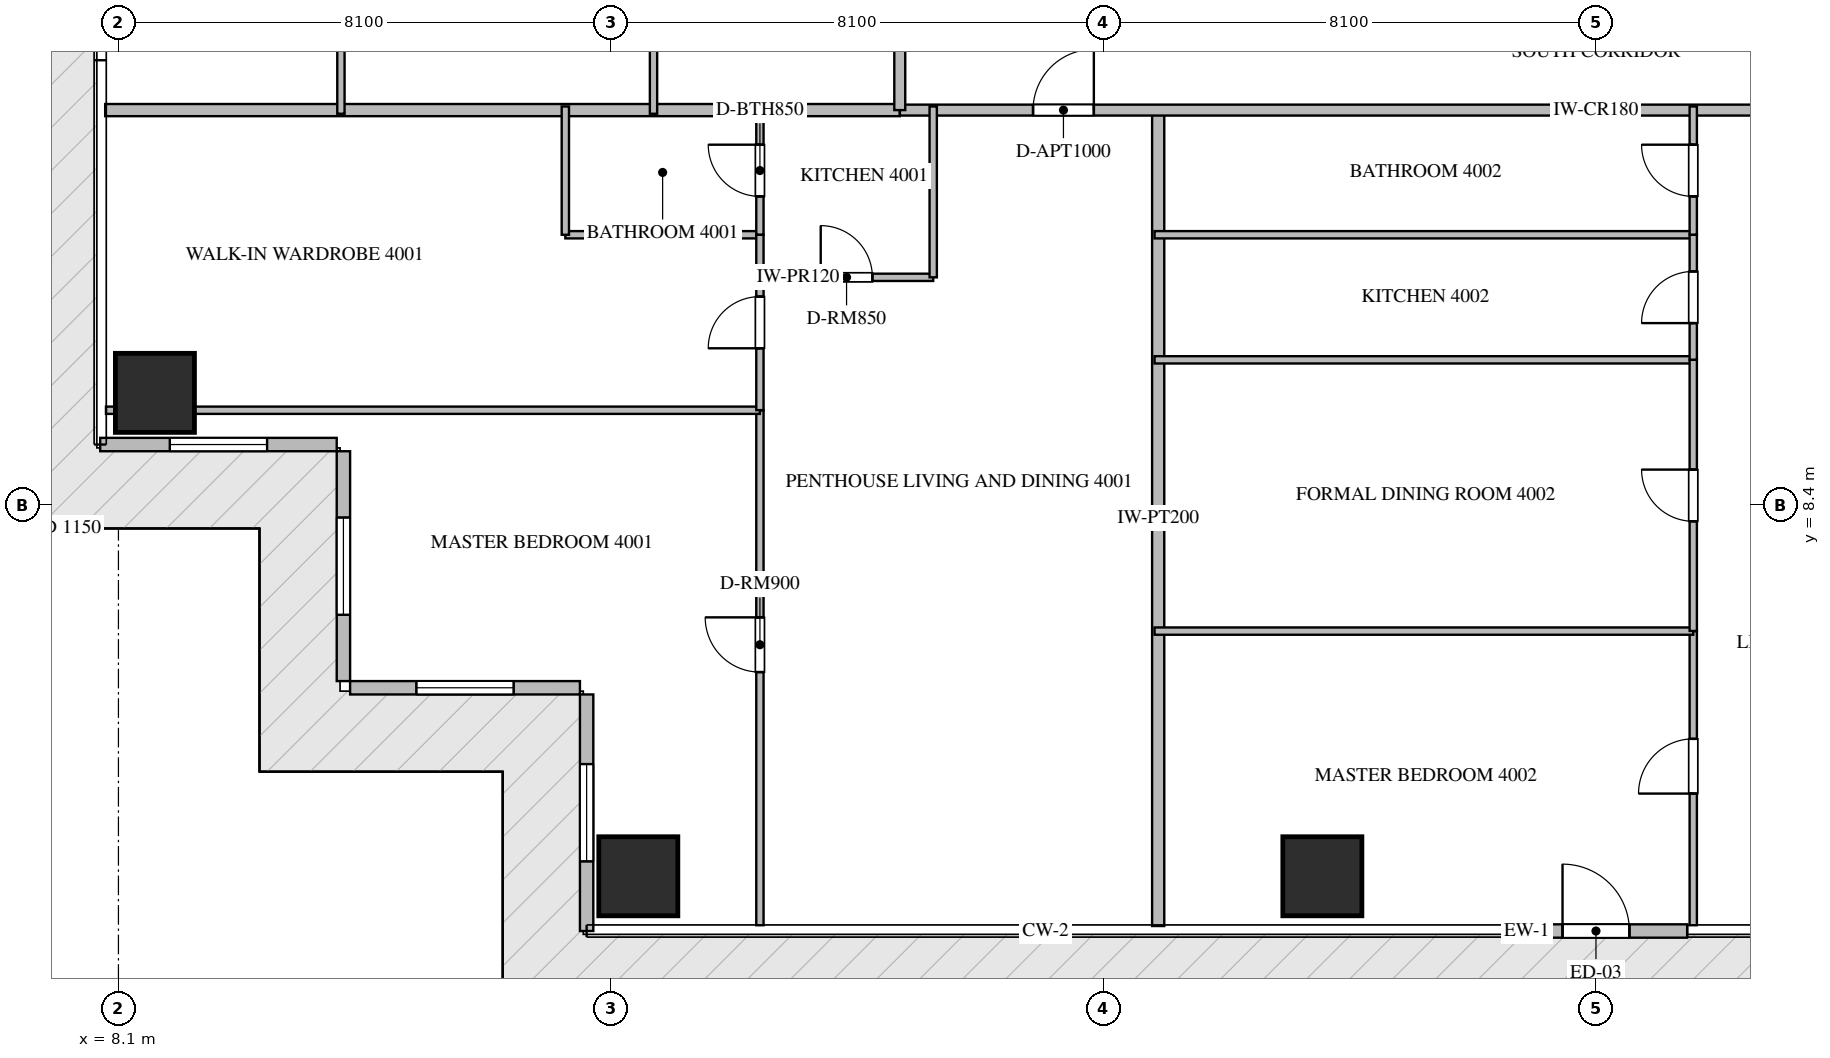
"""IFC4 building model, lengths in metres.
Left out: names, types, materials, properties, quantities, classifications, styles, units other than length and angle.
Written with IfcOpenShell. Run it as: python <this file> out.ifc"""

import sys

from ifc_helpers import new_model, si_unit, direction, frame, frame_2d, origin, origin_2d, place, context, subcontext, project, spatial, rectangle, extrude, source, transform, mapped, element, fill, save


model = new_model("IFC4")
c1 = context("Model", 3, precision=1e-05, world=origin(), true_north=direction((0.0, 1.0)))
c2 = subcontext(c1, "Body", "Model", "MODEL_VIEW")
j1 = project(units=[si_unit("LENGTHUNIT", "METRE"), si_unit("PLANEANGLEUNIT", "RADIAN")], contexts=[c1])
p1 = place(None, origin())
s1 = spatial("IfcSite", under=j1, at=p1, CompositionType="ELEMENT")
p2 = place(p1, origin())
s2 = spatial("IfcBuilding", under=s1, at=p2, CompositionType="ELEMENT")
p3 = place(p2, frame((0.0, 0.0, 161.4)))
s3 = spatial("IfcBuildingStorey", under=s2, at=p3, CompositionType="ELEMENT", Elevation=161.4)
m1 = source(origin(), c2, "Body", "SweptSolid", [
    extrude(rectangle(XDim=1.3, YDim=1.3, at=origin_2d()), origin(), (0.0, 0.0, 1.0), 3.75),
])
for number, where, z_axis, x_axis in (
    (1, (16.65, 2.3, -0.26), (0.0, 0.0, 1.0), (1.0, 0.0, 0.0)),
    (2, (27.9, 2.3, -0.26), (0.0, 0.0, 1.0), (1.0, 0.0, 0.0)),
    (3, (8.7, 10.25, -0.26), (0.0, 0.0, 1.0), (1.0, 0.0, 0.0)),
):
    element("IfcColumn", number, at=place(p3, frame(where, z_axis=z_axis, x_axis=x_axis)), inside=s3, PredefinedType="COLUMN", context=c2, shape_type="MappedRepresentation", body=[
        mapped(m1, transform((0.0, 0.0, 0.0), scale=1.0)),
    ])
p4 = place(p3, frame((30.9, 1.4, 0.0), z_axis=(0.0, 0.0, 1.0), x_axis=(1.0, 0.0, 0.0)))
e4 = element("IfcWall", 4, at=p4, inside=s3, PredefinedType="ELEMENTEDWALL", context=c2, shape_type="SweptSolid", body=[
    extrude(rectangle(XDim=3.0, YDim=0.22, at=frame_2d((1.5, 0.0))), origin(), (0.0, 0.0, 1.0), 3.475),
])
p5 = place(p4, frame((0.95, 0.0, 0.0)))
e5 = element("IfcOpeningElement", 5, at=p5, cuts=e4, PredefinedType="OPENING", context=c2, shape_type="SweptSolid", body=[
    extrude(rectangle(XDim=1.1, YDim=2.2, at=frame_2d((0.55, 1.1))), frame((0.0, 0.12, 0.0), z_axis=(0.0, -1.0, 0.0), x_axis=(1.0, 0.0, 0.0)), (0.0, 0.0, 1.0), 0.24),
])
p6 = place(p3, frame((7.8, 9.4, 0.0), z_axis=(0.0, 0.0, 1.0), x_axis=(1.0, 0.0, 0.0)))
e6 = element("IfcWall", 6, at=p6, inside=s3, PredefinedType="ELEMENTEDWALL", context=c2, shape_type="SweptSolid", body=[
    extrude(rectangle(XDim=3.89, YDim=0.22, at=frame_2d((1.945, 0.0))), origin(), (0.0, 0.0, 1.0), 3.475),
])
p7 = place(p6, frame((1.145, 0.0, 0.65)))
e7 = element("IfcOpeningElement", 7, at=p7, cuts=e6, PredefinedType="OPENING", context=c2, shape_type="SweptSolid", body=[
    extrude(rectangle(XDim=1.6, YDim=2.1, at=frame_2d((0.8, 1.05))), frame((0.0, 0.12, 0.0), z_axis=(0.0, -1.0, 0.0), x_axis=(1.0, 0.0, 0.0)), (0.0, 0.0, 1.0), 0.24),
])
p8 = place(p3, frame((11.8, 9.29, 0.0), z_axis=(0.0, 0.0, 1.0), x_axis=(0.0, -1.0, 0.0)))
e8 = element("IfcWall", 8, at=p8, inside=s3, PredefinedType="ELEMENTEDWALL", context=c2, shape_type="SweptSolid", body=[
    extrude(rectangle(XDim=3.78, YDim=0.22, at=frame_2d((1.89, 0.0))), origin(), (0.0, 0.0, 1.0), 3.475),
])
p9 = place(p8, frame((1.09, 0.0, 0.65)))
e9 = element("IfcOpeningElement", 9, at=p9, cuts=e8, PredefinedType="OPENING", context=c2, shape_type="SweptSolid", body=[
    extrude(rectangle(XDim=1.6, YDim=2.1, at=frame_2d((0.8, 1.05))), frame((0.0, 0.12, 0.0), z_axis=(0.0, -1.0, 0.0), x_axis=(1.0, 0.0, 0.0)), (0.0, 0.0, 1.0), 0.24),
])
p10 = place(p3, frame((11.91, 5.4, 0.0), z_axis=(0.0, 0.0, 1.0), x_axis=(1.0, 0.0, 0.0)))
e10 = element("IfcWall", 10, at=p10, inside=s3, PredefinedType="ELEMENTEDWALL", context=c2, shape_type="SweptSolid", body=[
    extrude(rectangle(XDim=3.78, YDim=0.22, at=frame_2d((1.89, 0.0))), origin(), (0.0, 0.0, 1.0), 3.475),
])
p11 = place(p10, frame((1.09, 0.0, 0.65)))
e11 = element("IfcOpeningElement", 11, at=p11, cuts=e10, PredefinedType="OPENING", context=c2, shape_type="SweptSolid", body=[
    extrude(rectangle(XDim=1.6, YDim=2.1, at=frame_2d((0.8, 1.05))), frame((0.0, 0.12, 0.0), z_axis=(0.0, -1.0, 0.0), x_axis=(1.0, 0.0, 0.0)), (0.0, 0.0, 1.0), 0.24),
])
p12 = place(p3, frame((15.8, 5.29, 0.0), z_axis=(0.0, 0.0, 1.0), x_axis=(0.0, -1.0, 0.0)))
e12 = element("IfcWall", 12, at=p12, inside=s3, PredefinedType="ELEMENTEDWALL", context=c2, shape_type="SweptSolid", body=[
    extrude(rectangle(XDim=3.89, YDim=0.22, at=frame_2d((1.945, 0.0))), origin(), (0.0, 0.0, 1.0), 3.475),
])
p13 = place(p12, frame((1.145, 0.0, 0.65)))
e13 = element("IfcOpeningElement", 13, at=p13, cuts=e12, PredefinedType="OPENING", context=c2, shape_type="SweptSolid", body=[
    extrude(rectangle(XDim=1.6, YDim=2.1, at=frame_2d((0.8, 1.05))), frame((0.0, 0.12, 0.0), z_axis=(0.0, -1.0, 0.0), x_axis=(1.0, 0.0, 0.0)), (0.0, 0.0, 1.0), 0.24),
])
p14 = place(p3, frame((25.2, 1.482, 0.0), z_axis=(0.0, 0.0, 1.0), x_axis=(0.0, 1.0, 0.0)))
e14 = element("IfcWall", 14, at=p14, inside=s3, PredefinedType="PARTITIONING", context=c2, shape_type="SweptSolid", body=[
    extrude(rectangle(XDim=13.418, YDim=0.2, at=frame_2d((6.709, 0.0))), origin(), (0.0, 0.0, 1.0), 3.49),
])
p15 = place(p3, frame((7.882, 14.9, 0.0), z_axis=(0.0, 0.0, 1.0), x_axis=(1.0, 0.0, 0.0)))
e15 = element("IfcWall", 15, at=p15, inside=s3, PredefinedType="PARTITIONING", context=c2, shape_type="SweptSolid", body=[
    extrude(rectangle(XDim=13.068, YDim=0.2, at=frame_2d((6.534, 0.0))), origin(), (0.0, 0.0, 1.0), 3.49),
])
p16 = place(p3, frame((20.952, 14.9, 0.0), z_axis=(0.0, 0.0, 1.0), x_axis=(1.0, 0.0, 0.0)))
e16 = element("IfcWall", 16, at=p16, inside=s3, PredefinedType="PARTITIONING", context=c2, shape_type="SweptSolid", body=[
    extrude(rectangle(XDim=22.896, YDim=0.18, at=frame_2d((11.448, 0.0))), origin(), (0.0, 0.0, 1.0), 3.49),
])
p17 = place(p16, frame((2.19, 0.0, 0.0)))
e17 = element("IfcOpeningElement", 17, at=p17, cuts=e16, PredefinedType="OPENING", context=c2, shape_type="SweptSolid", body=[
    extrude(rectangle(XDim=1.0, YDim=2.15, at=frame_2d((0.5, 1.075))), frame((0.0, 0.1, 0.0), z_axis=(0.0, -1.0, 0.0), x_axis=(1.0, 0.0, 0.0)), (0.0, 0.0, 1.0), 0.2),
])
p18 = place(p16, frame((15.24, 0.0, 0.0)))
e18 = element("IfcOpeningElement", 18, at=p18, cuts=e16, PredefinedType="OPENING", context=c2, shape_type="SweptSolid", body=[
    extrude(rectangle(XDim=1.0, YDim=2.15, at=frame_2d((0.5, 1.075))), frame((0.0, 0.1, 0.0), z_axis=(0.0, -1.0, 0.0), x_axis=(1.0, 0.0, 0.0)), (0.0, 0.0, 1.0), 0.2),
])
p19 = place(p16, frame((19.706, 0.0, 0.0)))
e19 = element("IfcOpeningElement", 19, at=p19, cuts=e16, PredefinedType="OPENING", context=c2, shape_type="SweptSolid", body=[
    extrude(rectangle(XDim=1.0, YDim=2.15, at=frame_2d((0.5, 1.075))), frame((0.0, 0.1, 0.0), z_axis=(0.0, -1.0, 0.0), x_axis=(1.0, 0.0, 0.0)), (0.0, 0.0, 1.0), 0.2),
])
p20 = place(p3, frame((20.95, 14.9, 0.0), z_axis=(0.0, 0.0, 1.0), x_axis=(0.0, 1.0, 0.0)))
e20 = element("IfcWall", 20, at=p20, inside=s3, PredefinedType="PARTITIONING", context=c2, shape_type="SweptSolid", body=[
    extrude(rectangle(XDim=18.7, YDim=0.18, at=frame_2d((9.35, 0.0))), origin(), (0.0, 0.0, 1.0), 3.49),
])
p21 = place(p20, frame((14.603, 0.0, 0.0)))
e21 = element("IfcOpeningElement", 21, at=p21, cuts=e20, PredefinedType="OPENING", context=c2, shape_type="SweptSolid", body=[
    extrude(rectangle(XDim=1.0, YDim=2.15, at=frame_2d((0.5, 1.075))), frame((0.0, 0.1, 0.0), z_axis=(0.0, -1.0, 0.0), x_axis=(1.0, 0.0, 0.0)), (0.0, 0.0, 1.0), 0.2),
])
p22 = place(p3, frame((18.65, 12.15, 0.0), z_axis=(0.0, 0.0, 1.0), x_axis=(1.0, 0.0, 0.0)))
e22 = element("IfcWall", 22, at=p22, inside=s3, PredefinedType="PARTITIONING", context=c2, shape_type="SweptSolid", body=[
    extrude(rectangle(XDim=2.85, YDim=0.12, at=frame_2d((1.425, 0.0))), origin(), (0.0, 0.0, 1.0), 3.49),
])
p23 = place(p22, frame((1.0, 0.0, 0.0)))
e23 = element("IfcOpeningElement", 23, at=p23, cuts=e22, PredefinedType="OPENING", context=c2, shape_type="SweptSolid", body=[
    extrude(rectangle(XDim=0.85, YDim=2.1, at=frame_2d((0.425, 1.05))), frame((0.0, 0.07, 0.0), z_axis=(0.0, -1.0, 0.0), x_axis=(1.0, 0.0, 0.0)), (0.0, 0.0, 1.0), 0.14),
])
p24 = place(p3, frame((21.5, 12.15, 0.0), z_axis=(0.0, 0.0, 1.0), x_axis=(0.0, 1.0, 0.0)))
e24 = element("IfcWall", 24, at=p24, inside=s3, PredefinedType="PARTITIONING", context=c2, shape_type="SweptSolid", body=[
    extrude(rectangle(XDim=2.81, YDim=0.12, at=frame_2d((1.405, 0.0))), origin(), (0.0, 0.0, 1.0), 3.49),
])
p25 = place(p3, frame((18.65, 1.495, 0.0), z_axis=(0.0, 0.0, 1.0), x_axis=(0.0, 1.0, 0.0)))
e25 = element("IfcWall", 25, at=p25, inside=s3, PredefinedType="PARTITIONING", context=c2, shape_type="SweptSolid", body=[
    extrude(rectangle(XDim=8.469, YDim=0.12, at=frame_2d((4.234, 0.0))), origin(), (0.0, 0.0, 1.0), 3.49),
])
p26 = place(p25, frame((4.163, 0.0, 0.0)))
e26 = element("IfcOpeningElement", 26, at=p26, cuts=e25, PredefinedType="OPENING", context=c2, shape_type="SweptSolid", body=[
    extrude(rectangle(XDim=0.9, YDim=2.1, at=frame_2d((0.45, 1.05))), frame((0.0, 0.07, 0.0), z_axis=(0.0, -1.0, 0.0), x_axis=(1.0, 0.0, 0.0)), (0.0, 0.0, 1.0), 0.14),
])
p27 = place(p3, frame((7.895, 9.964, 0.0), z_axis=(0.0, 0.0, 1.0), x_axis=(1.0, 0.0, 0.0)))
e27 = element("IfcWall", 27, at=p27, inside=s3, PredefinedType="PARTITIONING", context=c2, shape_type="SweptSolid", body=[
    extrude(rectangle(XDim=10.755, YDim=0.12, at=frame_2d((5.377, 0.0))), origin(), (0.0, 0.0, 1.0), 3.49),
])
p28 = place(p3, frame((15.45, 12.85, 0.0), z_axis=(0.0, 0.0, 1.0), x_axis=(1.0, 0.0, 0.0)))
e28 = element("IfcWall", 28, at=p28, inside=s3, PredefinedType="PARTITIONING", context=c2, shape_type="SweptSolid", body=[
    extrude(rectangle(XDim=3.2, YDim=0.12, at=frame_2d((1.6, 0.0))), origin(), (0.0, 0.0, 1.0), 3.49),
])
p29 = place(p3, frame((15.45, 12.85, 0.0), z_axis=(0.0, 0.0, 1.0), x_axis=(0.0, 1.0, 0.0)))
e29 = element("IfcWall", 29, at=p29, inside=s3, PredefinedType="PARTITIONING", context=c2, shape_type="SweptSolid", body=[
    extrude(rectangle(XDim=2.11, YDim=0.12, at=frame_2d((1.055, 0.0))), origin(), (0.0, 0.0, 1.0), 3.49),
])
p30 = place(p3, frame((18.65, 9.966, 0.0), z_axis=(0.0, 0.0, 1.0), x_axis=(0.0, 1.0, 0.0)))
e30 = element("IfcWall", 30, at=p30, inside=s3, PredefinedType="PARTITIONING", context=c2, shape_type="SweptSolid", body=[
    extrude(rectangle(XDim=2.884, YDim=0.12, at=frame_2d((1.442, 0.0))), origin(), (0.0, 0.0, 1.0), 3.49),
])
p31 = place(p30, frame((1.017, 0.0, 0.0)))
e31 = element("IfcOpeningElement", 31, at=p31, cuts=e30, PredefinedType="OPENING", context=c2, shape_type="SweptSolid", body=[
    extrude(rectangle(XDim=0.85, YDim=2.1, at=frame_2d((0.425, 1.05))), frame((0.0, 0.07, 0.0), z_axis=(0.0, -1.0, 0.0), x_axis=(1.0, 0.0, 0.0)), (0.0, 0.0, 1.0), 0.14),
])
p32 = place(p3, frame((18.65, 12.852, 0.0), z_axis=(0.0, 0.0, 1.0), x_axis=(0.0, 1.0, 0.0)))
e32 = element("IfcWall", 32, at=p32, inside=s3, PredefinedType="PARTITIONING", context=c2, shape_type="SweptSolid", body=[
    extrude(rectangle(XDim=2.108, YDim=0.12, at=frame_2d((1.054, 0.0))), origin(), (0.0, 0.0, 1.0), 3.49),
])
p33 = place(p32, frame((0.629, 0.0, 0.0)))
e33 = element("IfcOpeningElement", 33, at=p33, cuts=e32, PredefinedType="OPENING", context=c2, shape_type="SweptSolid", body=[
    extrude(rectangle(XDim=0.85, YDim=2.1, at=frame_2d((0.425, 1.05))), frame((0.0, 0.07, 0.0), z_axis=(0.0, -1.0, 0.0), x_axis=(1.0, 0.0, 0.0)), (0.0, 0.0, 1.0), 0.14),
])
p34 = place(p3, frame((34.0, 1.495, 0.0), z_axis=(0.0, 0.0, 1.0), x_axis=(0.0, 1.0, 0.0)))
e34 = element("IfcWall", 34, at=p34, inside=s3, PredefinedType="PARTITIONING", context=c2, shape_type="SweptSolid", body=[
    extrude(rectangle(XDim=4.837, YDim=0.12, at=frame_2d((2.418, 0.0))), origin(), (0.0, 0.0, 1.0), 3.49),
])
p35 = place(p34, frame((2.165, 0.0, 0.0)))
e35 = element("IfcOpeningElement", 35, at=p35, cuts=e34, PredefinedType="OPENING", context=c2, shape_type="SweptSolid", body=[
    extrude(rectangle(XDim=0.9, YDim=2.1, at=frame_2d((0.45, 1.05))), frame((0.0, 0.07, 0.0), z_axis=(0.0, -1.0, 0.0), x_axis=(1.0, 0.0, 0.0)), (0.0, 0.0, 1.0), 0.14),
])
for number, where, z_axis, x_axis in (
    (36, (25.14, 6.332, 0.0), (0.0, 0.0, 1.0), (1.0, 0.0, 0.0)),
    (37, (25.14, 10.793, 0.0), (0.0, 0.0, 1.0), (1.0, 0.0, 0.0)),
    (38, (25.14, 12.85, 0.0), (0.0, 0.0, 1.0), (1.0, 0.0, 0.0)),
):
    element("IfcWall", number, at=place(p3, frame(where, z_axis=z_axis, x_axis=x_axis)), inside=s3, PredefinedType="PARTITIONING", context=c2, shape_type="SweptSolid", body=[
        extrude(rectangle(XDim=8.86, YDim=0.12, at=frame_2d((4.43, 0.0))), origin(), (0.0, 0.0, 1.0), 3.49),
    ])
p36 = place(p3, frame((34.0, 6.334, 0.0), z_axis=(0.0, 0.0, 1.0), x_axis=(0.0, 1.0, 0.0)))
e39 = element("IfcWall", 39, at=p36, inside=s3, PredefinedType="PARTITIONING", context=c2, shape_type="SweptSolid", body=[
    extrude(rectangle(XDim=4.459, YDim=0.12, at=frame_2d((2.229, 0.0))), origin(), (0.0, 0.0, 1.0), 3.49),
])
p37 = place(p36, frame((1.804, 0.0, 0.0)))
e40 = element("IfcOpeningElement", 40, at=p37, cuts=e39, PredefinedType="OPENING", context=c2, shape_type="SweptSolid", body=[
    extrude(rectangle(XDim=0.85, YDim=2.1, at=frame_2d((0.425, 1.05))), frame((0.0, 0.07, 0.0), z_axis=(0.0, -1.0, 0.0), x_axis=(1.0, 0.0, 0.0)), (0.0, 0.0, 1.0), 0.14),
])
p38 = place(p3, frame((34.0, 10.795, 0.0), z_axis=(0.0, 0.0, 1.0), x_axis=(0.0, 1.0, 0.0)))
e41 = element("IfcWall", 41, at=p38, inside=s3, PredefinedType="PARTITIONING", context=c2, shape_type="SweptSolid", body=[
    extrude(rectangle(XDim=2.055, YDim=0.12, at=frame_2d((1.028, 0.0))), origin(), (0.0, 0.0, 1.0), 3.49),
])
p39 = place(p38, frame((0.602, 0.0, 0.0)))
e42 = element("IfcOpeningElement", 42, at=p39, cuts=e41, PredefinedType="OPENING", context=c2, shape_type="SweptSolid", body=[
    extrude(rectangle(XDim=0.85, YDim=2.1, at=frame_2d((0.425, 1.05))), frame((0.0, 0.07, 0.0), z_axis=(0.0, -1.0, 0.0), x_axis=(1.0, 0.0, 0.0)), (0.0, 0.0, 1.0), 0.14),
])
p40 = place(p3, frame((34.0, 12.852, 0.0), z_axis=(0.0, 0.0, 1.0), x_axis=(0.0, 1.0, 0.0)))
e43 = element("IfcWall", 43, at=p40, inside=s3, PredefinedType="PARTITIONING", context=c2, shape_type="SweptSolid", body=[
    extrude(rectangle(XDim=2.108, YDim=0.12, at=frame_2d((1.054, 0.0))), origin(), (0.0, 0.0, 1.0), 3.49),
])
p41 = place(p40, frame((0.629, 0.0, 0.0)))
e44 = element("IfcOpeningElement", 44, at=p41, cuts=e43, PredefinedType="OPENING", context=c2, shape_type="SweptSolid", body=[
    extrude(rectangle(XDim=0.85, YDim=2.1, at=frame_2d((0.425, 1.05))), frame((0.0, 0.07, 0.0), z_axis=(0.0, -1.0, 0.0), x_axis=(1.0, 0.0, 0.0)), (0.0, 0.0, 1.0), 0.14),
])
p42 = place(p3, frame((11.759, 14.84, 0.0), z_axis=(0.0, 0.0, 1.0), x_axis=(0.0, 1.0, 0.0)))
e45 = element("IfcWall", 45, at=p42, inside=s3, PredefinedType="PARTITIONING", context=c2, shape_type="SweptSolid", body=[
    extrude(rectangle(XDim=11.65, YDim=0.12, at=frame_2d((5.825, 0.0))), origin(), (0.0, 0.0, 1.0), 3.49),
])
p43 = place(p3, frame((16.9, 14.84, 0.0), z_axis=(0.0, 0.0, 1.0), x_axis=(0.0, 1.0, 0.0)))
e46 = element("IfcWall", 46, at=p43, inside=s3, PredefinedType="PARTITIONING", context=c2, shape_type="SweptSolid", body=[
    extrude(rectangle(XDim=11.65, YDim=0.12, at=frame_2d((5.825, 0.0))), origin(), (0.0, 0.0, 1.0), 2.972),
])
m2 = source(origin(), c2, "Body", "SweptSolid", [
    extrude(rectangle(XDim=1.1, YDim=2.2, at=frame_2d((0.55, 1.1))), frame((0.0, 0.025, 0.0), z_axis=(0.0, -1.0, 0.0), x_axis=(1.0, 0.0, 0.0)), (0.0, 0.0, 1.0), 0.05),
])
p44 = place(p5, origin())
e47 = element("IfcDoor", 47, at=p44, inside=s3, OperationType="SINGLE_SWING_LEFT", PredefinedType="DOOR", context=c2, shape_type="MappedRepresentation", body=[
    mapped(m2, transform((0.0, 0.0, 0.0), scale=1.0)),
])
fill(e5, e47)
m3 = source(origin(), c2, "Body", "SweptSolid", [
    extrude(rectangle(XDim=1.6, YDim=2.1, at=frame_2d((0.8, 1.05))), frame((0.0, 0.03, 0.0), z_axis=(0.0, -1.0, 0.0), x_axis=(1.0, 0.0, 0.0)), (0.0, 0.0, 1.0), 0.06),
])
p45 = place(p7, origin())
e48 = element("IfcWindow", 48, at=p45, inside=s3, PartitioningType="SINGLE_PANEL", PredefinedType="WINDOW", context=c2, shape_type="MappedRepresentation", body=[
    mapped(m3, transform((0.0, 0.0, 0.0), scale=1.0)),
])
fill(e7, e48)
p46 = place(p9, origin())
e49 = element("IfcWindow", 49, at=p46, inside=s3, PartitioningType="SINGLE_PANEL", PredefinedType="WINDOW", context=c2, shape_type="MappedRepresentation", body=[
    mapped(m3, transform((0.0, 0.0, 0.0), scale=1.0)),
])
fill(e9, e49)
p47 = place(p11, origin())
e50 = element("IfcWindow", 50, at=p47, inside=s3, PartitioningType="SINGLE_PANEL", PredefinedType="WINDOW", context=c2, shape_type="MappedRepresentation", body=[
    mapped(m3, transform((0.0, 0.0, 0.0), scale=1.0)),
])
fill(e11, e50)
p48 = place(p13, origin())
e51 = element("IfcWindow", 51, at=p48, inside=s3, PartitioningType="SINGLE_PANEL", PredefinedType="WINDOW", context=c2, shape_type="MappedRepresentation", body=[
    mapped(m3, transform((0.0, 0.0, 0.0), scale=1.0)),
])
fill(e13, e51)
m4 = source(origin(), c2, "Body", "SweptSolid", [
    extrude(rectangle(XDim=1.0, YDim=2.15, at=frame_2d((0.5, 1.075))), frame((0.0, 0.025, 0.0), z_axis=(0.0, -1.0, 0.0), x_axis=(1.0, 0.0, 0.0)), (0.0, 0.0, 1.0), 0.05),
])
p49 = place(p17, origin())
e52 = element("IfcDoor", 52, at=p49, inside=s3, OperationType="SINGLE_SWING_RIGHT", PredefinedType="DOOR", context=c2, shape_type="MappedRepresentation", body=[
    mapped(m4, transform((0.0, 0.0, 0.0), scale=1.0)),
])
fill(e17, e52)
m5 = source(origin(), c2, "Body", "SweptSolid", [
    extrude(rectangle(XDim=0.85, YDim=2.1, at=frame_2d((0.425, 1.05))), frame((0.0, 0.025, 0.0), z_axis=(0.0, -1.0, 0.0), x_axis=(1.0, 0.0, 0.0)), (0.0, 0.0, 1.0), 0.05),
])
p50 = place(p23, origin())
e53 = element("IfcDoor", 53, at=p50, inside=s3, OperationType="SINGLE_SWING_LEFT", PredefinedType="DOOR", context=c2, shape_type="MappedRepresentation", body=[
    mapped(m5, transform((0.0, 0.0, 0.0), scale=1.0)),
])
fill(e23, e53)
m6 = source(origin(), c2, "Body", "SweptSolid", [
    extrude(rectangle(XDim=0.9, YDim=2.1, at=frame_2d((0.45, 1.05))), frame((0.0, 0.025, 0.0), z_axis=(0.0, -1.0, 0.0), x_axis=(1.0, 0.0, 0.0)), (0.0, 0.0, 1.0), 0.05),
])
p51 = place(p26, origin())
e54 = element("IfcDoor", 54, at=p51, inside=s3, OperationType="SINGLE_SWING_RIGHT", PredefinedType="DOOR", context=c2, shape_type="MappedRepresentation", body=[
    mapped(m6, transform((0.0, 0.0, 0.0), scale=1.0)),
])
fill(e26, e54)
p52 = place(p31, origin())
e55 = element("IfcDoor", 55, at=p52, inside=s3, OperationType="SINGLE_SWING_LEFT", PredefinedType="DOOR", context=c2, shape_type="MappedRepresentation", body=[
    mapped(m5, transform((0.0, 0.0, 0.0), scale=1.0)),
])
fill(e31, e55)
p53 = place(p33, origin())
e56 = element("IfcDoor", 56, at=p53, inside=s3, OperationType="SINGLE_SWING_RIGHT", PredefinedType="DOOR", context=c2, shape_type="MappedRepresentation", body=[
    mapped(m5, transform((0.0, 0.0, 0.0), scale=1.0)),
])
fill(e33, e56)
p54 = place(p35, origin())
e57 = element("IfcDoor", 57, at=p54, inside=s3, OperationType="SINGLE_SWING_LEFT", PredefinedType="DOOR", context=c2, shape_type="MappedRepresentation", body=[
    mapped(m6, transform((0.0, 0.0, 0.0), scale=1.0)),
])
fill(e35, e57)
p55 = place(p37, origin())
e58 = element("IfcDoor", 58, at=p55, inside=s3, OperationType="SINGLE_SWING_RIGHT", PredefinedType="DOOR", context=c2, shape_type="MappedRepresentation", body=[
    mapped(m5, transform((0.0, 0.0, 0.0), scale=1.0)),
])
fill(e40, e58)
p56 = place(p39, origin())
e59 = element("IfcDoor", 59, at=p56, inside=s3, OperationType="SINGLE_SWING_LEFT", PredefinedType="DOOR", context=c2, shape_type="MappedRepresentation", body=[
    mapped(m5, transform((0.0, 0.0, 0.0), scale=1.0)),
])
fill(e42, e59)
p57 = place(p41, origin())
e60 = element("IfcDoor", 60, at=p57, inside=s3, OperationType="SINGLE_SWING_RIGHT", PredefinedType="DOOR", context=c2, shape_type="MappedRepresentation", body=[
    mapped(m5, transform((0.0, 0.0, 0.0), scale=1.0)),
])
fill(e44, e60)
save(model, sys.argv[1])
